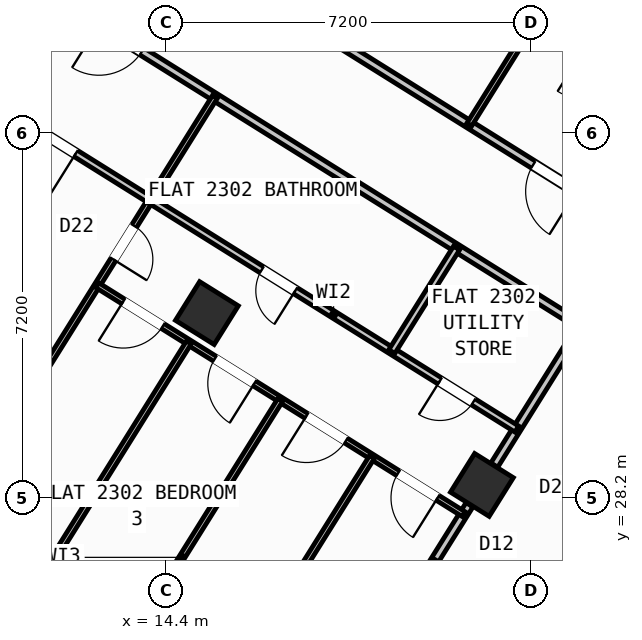
"""IFC4 building model, lengths in metres.
Left out: names, types, materials, properties, quantities, classifications, styles, units other than length and angle.
Written with IfcOpenShell. Run it as: python <this file> out.ifc"""

import sys

from ifc_helpers import new_model, si_unit, direction, frame, frame_2d, origin, origin_2d, place, context, subcontext, project, spatial, rectangle, hollow_rectangle, extrude, source, transform, mapped, element, fill, save


model = new_model("IFC4")
c1 = context("Model", 3, precision=1e-05, world=origin(), true_north=direction((0.0, 1.0)))
c2 = subcontext(c1, "Body", "Model", "MODEL_VIEW")
j1 = project(units=[si_unit("LENGTHUNIT", "METRE"), si_unit("PLANEANGLEUNIT", "RADIAN")], contexts=[c1])
p1 = place(None, origin())
s1 = spatial("IfcSite", under=j1, at=p1, CompositionType="ELEMENT")
p2 = place(p1, origin())
s2 = spatial("IfcBuilding", under=s1, at=p2, CompositionType="ELEMENT")
p3 = place(p2, frame((0.0, 0.0, 93.6)))
s3 = spatial("IfcBuildingStorey", under=s2, at=p3, CompositionType="ELEMENT", Elevation=93.6)
m1 = source(origin(), c2, "Body", "SweptSolid", [
    extrude(hollow_rectangle(XDim=0.9, YDim=0.9, WallThickness=0.036, at=origin_2d()), origin(), (0.0, 0.0, 1.0), 3.6),
])
for number, where, z_axis, x_axis in (
    (1, (20.632, 28.452, 0.0), (0.0, 0.0, 1.0), (-0.848, 0.53, 0.0)),
    (2, (15.205, 31.844, 0.0), (0.0, 0.0, 1.0), (-0.848, 0.53, 0.0)),
):
    element("IfcColumn", number, at=place(p3, frame(where, z_axis=z_axis, x_axis=x_axis)), inside=s3, PredefinedType="COLUMN", context=c2, shape_type="MappedRepresentation", body=[
        mapped(m1, transform((0.0, 0.0, 0.0), scale=1.0)),
    ])
p4 = place(p3, frame((31.76, 12.183, 0.0), z_axis=(0.0, 0.0, 1.0), x_axis=(-0.848047074256, 0.529920899612, 0.0)))
e3 = element("IfcWall", 3, at=p4, inside=s3, PredefinedType="STANDARD", context=c2, shape_type="SweptSolid", body=[
    extrude(rectangle(XDim=30.652, YDim=0.32, at=frame_2d((15.326, 0.0))), origin(), (0.0, 0.0, 1.0), 3.35),
])
p5 = place(p4, frame((15.153, 0.0, 0.0)))
e4 = element("IfcOpeningElement", 4, at=p5, cuts=e3, PredefinedType="OPENING", context=c2, shape_type="SweptSolid", body=[
    extrude(rectangle(XDim=1.2, YDim=2.15, at=frame_2d((0.6, 1.075))), frame((0.0, 0.17, 0.0), z_axis=(0.0, -1.0, 0.0), x_axis=(1.0, 0.0, 0.0)), (0.0, 0.0, 1.0), 0.34),
])
p6 = place(p4, frame((2.002, 0.0, 0.8)))
e5 = element("IfcOpeningElement", 5, at=p6, cuts=e3, PredefinedType="OPENING", context=c2, shape_type="SweptSolid", body=[
    extrude(rectangle(XDim=2.1, YDim=1.55, at=frame_2d((1.05, 0.775))), frame((0.0, 0.17, 0.0), z_axis=(0.0, -1.0, 0.0), x_axis=(1.0, 0.0, 0.0)), (0.0, 0.0, 1.0), 0.34),
])
p7 = place(p4, frame((7.206, 0.0, 0.8)))
e6 = element("IfcOpeningElement", 6, at=p7, cuts=e3, PredefinedType="OPENING", context=c2, shape_type="SweptSolid", body=[
    extrude(rectangle(XDim=2.1, YDim=1.55, at=frame_2d((1.05, 0.775))), frame((0.0, 0.17, 0.0), z_axis=(0.0, -1.0, 0.0), x_axis=(1.0, 0.0, 0.0)), (0.0, 0.0, 1.0), 0.34),
])
p8 = place(p4, frame((12.648, 0.0, 1.0)))
e7 = element("IfcOpeningElement", 7, at=p8, cuts=e3, PredefinedType="OPENING", context=c2, shape_type="SweptSolid", body=[
    extrude(rectangle(XDim=0.9, YDim=1.25, at=frame_2d((0.45, 0.625))), frame((0.0, 0.17, 0.0), z_axis=(0.0, -1.0, 0.0), x_axis=(1.0, 0.0, 0.0)), (0.0, 0.0, 1.0), 0.34),
])
p9 = place(p4, frame((27.974, 0.0, 0.95)))
e8 = element("IfcOpeningElement", 8, at=p9, cuts=e3, PredefinedType="OPENING", context=c2, shape_type="SweptSolid", body=[
    extrude(rectangle(XDim=1.2, YDim=1.4, at=frame_2d((0.6, 0.7))), frame((0.0, 0.17, 0.0), z_axis=(0.0, -1.0, 0.0), x_axis=(1.0, 0.0, 0.0)), (0.0, 0.0, 1.0), 0.34),
])
p10 = place(p4, frame((18.347, 0.0, 1.0)))
e9 = element("IfcOpeningElement", 9, at=p10, cuts=e3, PredefinedType="OPENING", context=c2, shape_type="SweptSolid", body=[
    extrude(rectangle(XDim=0.9, YDim=1.25, at=frame_2d((0.45, 0.625))), frame((0.0, 0.17, 0.0), z_axis=(0.0, -1.0, 0.0), x_axis=(1.0, 0.0, 0.0)), (0.0, 0.0, 1.0), 0.34),
])
p11 = place(p4, frame((20.931, 0.0, 1.0)))
e10 = element("IfcOpeningElement", 10, at=p11, cuts=e3, PredefinedType="OPENING", context=c2, shape_type="SweptSolid", body=[
    extrude(rectangle(XDim=0.65, YDim=1.15, at=frame_2d((0.325, 0.575))), frame((0.0, 0.17, 0.0), z_axis=(0.0, -1.0, 0.0), x_axis=(1.0, 0.0, 0.0)), (0.0, 0.0, 1.0), 0.34),
])
p12 = place(p4, frame((22.938, 0.0, 1.0)))
e11 = element("IfcOpeningElement", 11, at=p12, cuts=e3, PredefinedType="OPENING", context=c2, shape_type="SweptSolid", body=[
    extrude(rectangle(XDim=0.9, YDim=1.25, at=frame_2d((0.45, 0.625))), frame((0.0, 0.17, 0.0), z_axis=(0.0, -1.0, 0.0), x_axis=(1.0, 0.0, 0.0)), (0.0, 0.0, 1.0), 0.34),
])
p13 = place(p4, frame((25.069, 0.0, 1.0)))
e12 = element("IfcOpeningElement", 12, at=p13, cuts=e3, PredefinedType="OPENING", context=c2, shape_type="SweptSolid", body=[
    extrude(rectangle(XDim=0.9, YDim=1.25, at=frame_2d((0.45, 0.625))), frame((0.0, 0.17, 0.0), z_axis=(0.0, -1.0, 0.0), x_axis=(1.0, 0.0, 0.0)), (0.0, 0.0, 1.0), 0.34),
])
p14 = place(p3, frame((5.7, 28.71, 0.0), z_axis=(0.0, 0.0, 1.0), x_axis=(0.529923711467, 0.8480453172, 0.0)))
e13 = element("IfcWall", 13, at=p14, inside=s3, PredefinedType="STANDARD", context=c2, shape_type="SweptSolid", body=[
    extrude(rectangle(XDim=21.587, YDim=0.32, at=frame_2d((10.794, 0.0))), origin(), (0.0, 0.0, 1.0), 2.775),
])
p15 = place(p14, frame((2.994, 0.0, 0.8)))
e14 = element("IfcOpeningElement", 14, at=p15, cuts=e13, PredefinedType="OPENING", context=c2, shape_type="SweptSolid", body=[
    extrude(rectangle(XDim=2.1, YDim=1.55, at=frame_2d((1.05, 0.775))), frame((0.0, 0.17, 0.0), z_axis=(0.0, -1.0, 0.0), x_axis=(1.0, 0.0, 0.0)), (0.0, 0.0, 1.0), 0.34),
])
p16 = place(p14, frame((9.739, 0.0, 1.0)))
e15 = element("IfcOpeningElement", 15, at=p16, cuts=e13, PredefinedType="OPENING", context=c2, shape_type="SweptSolid", body=[
    extrude(rectangle(XDim=0.9, YDim=1.25, at=frame_2d((0.45, 0.625))), frame((0.0, 0.17, 0.0), z_axis=(0.0, -1.0, 0.0), x_axis=(1.0, 0.0, 0.0)), (0.0, 0.0, 1.0), 0.34),
])
p17 = place(p14, frame((18.639, 0.0, 0.85)))
e16 = element("IfcOpeningElement", 16, at=p17, cuts=e13, PredefinedType="OPENING", context=c2, shape_type="SweptSolid", body=[
    extrude(rectangle(XDim=1.5, YDim=1.5, at=frame_2d((0.75, 0.75))), frame((0.0, 0.17, 0.0), z_axis=(0.0, -1.0, 0.0), x_axis=(1.0, 0.0, 0.0)), (0.0, 0.0, 1.0), 0.34),
])
p18 = place(p3, frame((17.424, 47.083, 0.0), z_axis=(0.0, 0.0, 1.0), x_axis=(0.848049927979, -0.529916332693, 0.0)))
e17 = element("IfcWall", 17, at=p18, inside=s3, PredefinedType="STANDARD", context=c2, shape_type="SweptSolid", body=[
    extrude(rectangle(XDim=29.223, YDim=0.32, at=frame_2d((14.612, 0.0))), origin(), (0.0, 0.0, 1.0), 3.35),
])
p19 = place(p18, frame((3.745, 0.0, 0.0)))
e18 = element("IfcOpeningElement", 18, at=p19, cuts=e17, PredefinedType="OPENING", context=c2, shape_type="SweptSolid", body=[
    extrude(rectangle(XDim=1.05, YDim=2.15, at=frame_2d((0.525, 1.075))), frame((0.0, 0.17, 0.0), z_axis=(0.0, -1.0, 0.0), x_axis=(1.0, 0.0, 0.0)), (0.0, 0.0, 1.0), 0.34),
])
p20 = place(p18, frame((0.699, 0.0, 0.95)))
e19 = element("IfcOpeningElement", 19, at=p20, cuts=e17, PredefinedType="OPENING", context=c2, shape_type="SweptSolid", body=[
    extrude(rectangle(XDim=1.2, YDim=1.4, at=frame_2d((0.6, 0.7))), frame((0.0, 0.17, 0.0), z_axis=(0.0, -1.0, 0.0), x_axis=(1.0, 0.0, 0.0)), (0.0, 0.0, 1.0), 0.34),
])
p21 = place(p18, frame((6.951, 0.0, 1.0)))
e20 = element("IfcOpeningElement", 20, at=p21, cuts=e17, PredefinedType="OPENING", context=c2, shape_type="SweptSolid", body=[
    extrude(rectangle(XDim=0.9, YDim=1.25, at=frame_2d((0.45, 0.625))), frame((0.0, 0.17, 0.0), z_axis=(0.0, -1.0, 0.0), x_axis=(1.0, 0.0, 0.0)), (0.0, 0.0, 1.0), 0.34),
])
p22 = place(p18, frame((9.841, 0.0, 0.85)))
e21 = element("IfcOpeningElement", 21, at=p22, cuts=e17, PredefinedType="OPENING", context=c2, shape_type="SweptSolid", body=[
    extrude(rectangle(XDim=1.5, YDim=1.5, at=frame_2d((0.75, 0.75))), frame((0.0, 0.17, 0.0), z_axis=(0.0, -1.0, 0.0), x_axis=(1.0, 0.0, 0.0)), (0.0, 0.0, 1.0), 0.34),
])
p23 = place(p18, frame((13.889, 0.0, 0.95)))
e22 = element("IfcOpeningElement", 22, at=p23, cuts=e17, PredefinedType="OPENING", context=c2, shape_type="SweptSolid", body=[
    extrude(rectangle(XDim=1.2, YDim=1.4, at=frame_2d((0.6, 0.7))), frame((0.0, 0.17, 0.0), z_axis=(0.0, -1.0, 0.0), x_axis=(1.0, 0.0, 0.0)), (0.0, 0.0, 1.0), 0.34),
])
p24 = place(p18, frame((17.254, 0.0, 1.0)))
e23 = element("IfcOpeningElement", 23, at=p24, cuts=e17, PredefinedType="OPENING", context=c2, shape_type="SweptSolid", body=[
    extrude(rectangle(XDim=0.9, YDim=1.25, at=frame_2d((0.45, 0.625))), frame((0.0, 0.17, 0.0), z_axis=(0.0, -1.0, 0.0), x_axis=(1.0, 0.0, 0.0)), (0.0, 0.0, 1.0), 0.34),
])
p25 = place(p18, frame((20.764, 0.0, 0.8)))
e24 = element("IfcOpeningElement", 24, at=p25, cuts=e17, PredefinedType="OPENING", context=c2, shape_type="SweptSolid", body=[
    extrude(rectangle(XDim=2.1, YDim=1.55, at=frame_2d((1.05, 0.775))), frame((0.0, 0.17, 0.0), z_axis=(0.0, -1.0, 0.0), x_axis=(1.0, 0.0, 0.0)), (0.0, 0.0, 1.0), 0.34),
])
p26 = place(p18, frame((25.403, 0.0, 0.8)))
e25 = element("IfcOpeningElement", 25, at=p26, cuts=e17, PredefinedType="OPENING", context=c2, shape_type="SweptSolid", body=[
    extrude(rectangle(XDim=2.1, YDim=1.55, at=frame_2d((1.05, 0.775))), frame((0.0, 0.17, 0.0), z_axis=(0.0, -1.0, 0.0), x_axis=(1.0, 0.0, 0.0)), (0.0, 0.0, 1.0), 0.34),
])
p27 = place(p3, frame((25.807, 29.582, 0.0), z_axis=(0.0, 0.0, 1.0), x_axis=(-0.529920357077, -0.848047413271, 0.0)))
e26 = element("IfcWall", 26, at=p27, inside=s3, PredefinedType="PARTITIONING", context=c2, shape_type="SweptSolid", body=[
    extrude(rectangle(XDim=11.45, YDim=0.16, at=frame_2d((5.725, 0.0))), origin(), (0.0, 0.0, 1.0), 3.34),
])
p28 = place(p3, frame((26.973, 31.447, 0.0), z_axis=(0.0, 0.0, 1.0), x_axis=(-0.848048310262, 0.529918921593, 0.0)))
e27 = element("IfcWall", 27, at=p28, inside=s3, PredefinedType="PARTITIONING", context=c2, shape_type="SweptSolid", body=[
    extrude(rectangle(XDim=16.73, YDim=0.16, at=frame_2d((8.365, 0.0))), origin(), (0.0, 0.0, 1.0), 3.34),
])
p29 = place(p28, frame((2.22, 0.0, 0.0)))
e28 = element("IfcOpeningElement", 28, at=p29, cuts=e27, PredefinedType="OPENING", context=c2, shape_type="SweptSolid", body=[
    extrude(rectangle(XDim=0.86, YDim=2.05, at=frame_2d((0.43, 1.025))), frame((0.0, 0.09, 0.0), z_axis=(0.0, -1.0, 0.0), x_axis=(1.0, 0.0, 0.0)), (0.0, 0.0, 1.0), 0.18),
])
p30 = place(p28, frame((5.28, 0.0, 0.0)))
e29 = element("IfcOpeningElement", 29, at=p30, cuts=e27, PredefinedType="OPENING", context=c2, shape_type="SweptSolid", body=[
    extrude(rectangle(XDim=1.0, YDim=2.1, at=frame_2d((0.5, 1.05))), frame((0.0, 0.09, 0.0), z_axis=(0.0, -1.0, 0.0), x_axis=(1.0, 0.0, 0.0)), (0.0, 0.0, 1.0), 0.18),
])
p31 = place(p3, frame((25.807, 29.582, 0.0), z_axis=(0.0, 0.0, 1.0), x_axis=(-0.848052408131, 0.529912363569, 0.0)))
e30 = element("IfcWall", 30, at=p31, inside=s3, PredefinedType="PARTITIONING", context=c2, shape_type="SweptSolid", body=[
    extrude(rectangle(XDim=16.73, YDim=0.16, at=frame_2d((8.365, 0.0))), origin(), (0.0, 0.0, 1.0), 3.34),
])
p32 = place(p31, frame((2.22, 0.0, 0.0)))
e31 = element("IfcOpeningElement", 31, at=p32, cuts=e30, PredefinedType="OPENING", context=c2, shape_type="SweptSolid", body=[
    extrude(rectangle(XDim=0.86, YDim=2.05, at=frame_2d((0.43, 1.025))), frame((0.0, 0.09, 0.0), z_axis=(0.0, -1.0, 0.0), x_axis=(1.0, 0.0, 0.0)), (0.0, 0.0, 1.0), 0.18),
])
p33 = place(p31, frame((14.013, 0.0, 0.0)))
e32 = element("IfcOpeningElement", 32, at=p33, cuts=e30, PredefinedType="OPENING", context=c2, shape_type="SweptSolid", body=[
    extrude(rectangle(XDim=1.0, YDim=2.1, at=frame_2d((0.5, 1.05))), frame((0.0, 0.09, 0.0), z_axis=(0.0, -1.0, 0.0), x_axis=(1.0, 0.0, 0.0)), (0.0, 0.0, 1.0), 0.18),
])
p34 = place(p3, frame((22.593, 31.59, 0.0), z_axis=(0.0, 0.0, 1.0), x_axis=(-0.529924383291, -0.848044897393, 0.0)))
e33 = element("IfcWall", 33, at=p34, inside=s3, PredefinedType="PARTITIONING", context=c2, shape_type="SweptSolid", body=[
    extrude(rectangle(XDim=3.238, YDim=0.16, at=frame_2d((1.619, 0.0))), origin(), (0.0, 0.0, 1.0), 2.775),
])
p35 = place(p3, frame((20.387, 28.06, 0.0), z_axis=(0.0, 0.0, 1.0), x_axis=(-0.529902564924, -0.848058530814, 0.0)))
e34 = element("IfcWall", 34, at=p35, inside=s3, PredefinedType="PARTITIONING", context=c2, shape_type="SweptSolid", body=[
    extrude(rectangle(XDim=6.376, YDim=0.16, at=frame_2d((3.188, 0.0))), origin(), (0.0, 0.0, 1.0), 2.775),
])
p36 = place(p3, frame((24.492, 30.403, 0.0), z_axis=(0.0, 0.0, 1.0), x_axis=(-0.529919283494, -0.848048084121, 0.0)))
e35 = element("IfcWall", 35, at=p36, inside=s3, PredefinedType="PLUMBINGWALL", context=c2, shape_type="SweptSolid", body=[
    extrude(rectangle(XDim=5.51, YDim=0.14, at=frame_2d((2.755, 0.0))), origin(), (0.0, 0.0, 1.0), 2.995),
])
p37 = place(p36, frame((2.365, 0.0, 0.0)))
e36 = element("IfcOpeningElement", 36, at=p37, cuts=e35, PredefinedType="OPENING", context=c2, shape_type="SweptSolid", body=[
    extrude(rectangle(XDim=0.78, YDim=2.05, at=frame_2d((0.39, 1.025))), frame((0.0, 0.08, 0.0), z_axis=(0.0, -1.0, 0.0), x_axis=(1.0, 0.0, 0.0)), (0.0, 0.0, 1.0), 0.16),
])
p38 = place(p3, frame((15.361, 36.108, 0.0), z_axis=(0.0, 0.0, 1.0), x_axis=(-0.529912802348, -0.848052133956, 0.0)))
e37 = element("IfcWall", 37, at=p38, inside=s3, PredefinedType="PARTITIONING", context=c2, shape_type="SweptSolid", body=[
    extrude(rectangle(XDim=11.72, YDim=0.11, at=frame_2d((5.86, 0.0))), origin(), (0.0, 0.0, 1.0), 2.995),
])
p39 = place(p38, frame((3.0, 0.0, 0.0)))
e38 = element("IfcOpeningElement", 38, at=p39, cuts=e37, PredefinedType="OPENING", context=c2, shape_type="SweptSolid", body=[
    extrude(rectangle(XDim=0.78, YDim=2.05, at=frame_2d((0.39, 1.025))), frame((0.0, 0.065, 0.0), z_axis=(0.0, -1.0, 0.0), x_axis=(1.0, 0.0, 0.0)), (0.0, 0.0, 1.0), 0.13),
])
p40 = place(p3, frame((14.09, 34.073, 0.0), z_axis=(0.0, 0.0, 1.0), x_axis=(-0.848045135007, 0.529924003034, 0.0)))
e39 = element("IfcWall", 39, at=p40, inside=s3, PredefinedType="PLUMBINGWALL", context=c2, shape_type="SweptSolid", body=[
    extrude(rectangle(XDim=4.393, YDim=0.14, at=frame_2d((2.196, 0.0))), origin(), (0.0, 0.0, 1.0), 3.34),
])
p41 = place(p40, frame((1.737, 0.0, 0.0)))
e40 = element("IfcOpeningElement", 40, at=p41, cuts=e39, PredefinedType="OPENING", context=c2, shape_type="SweptSolid", body=[
    extrude(rectangle(XDim=0.92, YDim=2.08, at=frame_2d((0.46, 1.04))), frame((0.0, 0.08, 0.0), z_axis=(0.0, -1.0, 0.0), x_axis=(1.0, 0.0, 0.0)), (0.0, 0.0, 1.0), 0.16),
])
p42 = place(p3, frame((21.321, 29.554, 0.0), z_axis=(0.0, 0.0, 1.0), x_axis=(-0.84803529765, 0.529939745575, 0.0)))
e41 = element("IfcWall", 41, at=p42, inside=s3, PredefinedType="PLUMBINGWALL", context=c2, shape_type="SweptSolid", body=[
    extrude(rectangle(XDim=8.527, YDim=0.14, at=frame_2d((4.264, 0.0))), origin(), (0.0, 0.0, 1.0), 3.34),
])
p43 = place(p42, frame((5.155, 0.0, 0.0)))
e42 = element("IfcOpeningElement", 42, at=p43, cuts=e41, PredefinedType="OPENING", context=c2, shape_type="SweptSolid", body=[
    extrude(rectangle(XDim=0.78, YDim=2.05, at=frame_2d((0.39, 1.025))), frame((0.0, 0.08, 0.0), z_axis=(0.0, -1.0, 0.0), x_axis=(1.0, 0.0, 0.0)), (0.0, 0.0, 1.0), 0.16),
])
p44 = place(p42, frame((1.011, 0.0, 0.0)))
e43 = element("IfcOpeningElement", 43, at=p44, cuts=e41, PredefinedType="OPENING", context=c2, shape_type="SweptSolid", body=[
    extrude(rectangle(XDim=0.78, YDim=2.05, at=frame_2d((0.39, 1.025))), frame((0.0, 0.08, 0.0), z_axis=(0.0, -1.0, 0.0), x_axis=(1.0, 0.0, 0.0)), (0.0, 0.0, 1.0), 0.16),
])
p45 = place(p3, frame((20.132, 33.128, 0.0), z_axis=(0.0, 0.0, 1.0), x_axis=(-0.529935194983, -0.848038141311, 0.0)))
e44 = element("IfcWall", 44, at=p45, inside=s3, PredefinedType="PLUMBINGWALL", context=c2, shape_type="SweptSolid", body=[
    extrude(rectangle(XDim=2.41, YDim=0.14, at=frame_2d((1.205, 0.0))), origin(), (0.0, 0.0, 1.0), 3.34),
])
p46 = place(p3, frame((20.272, 27.875, 0.0), z_axis=(0.0, 0.0, 1.0), x_axis=(-0.848056204746, 0.529906287557, 0.0)))
e45 = element("IfcWall", 45, at=p46, inside=s3, PredefinedType="PARTITIONING", context=c2, shape_type="SweptSolid", body=[
    extrude(rectangle(XDim=8.527, YDim=0.11, at=frame_2d((4.264, 0.0))), origin(), (0.0, 0.0, 1.0), 3.34),
])
p47 = place(p46, frame((0.606, 0.0, 0.0)))
e46 = element("IfcOpeningElement", 46, at=p47, cuts=e45, PredefinedType="OPENING", context=c2, shape_type="SweptSolid", body=[
    extrude(rectangle(XDim=0.92, YDim=2.08, at=frame_2d((0.46, 1.04))), frame((0.0, 0.065, 0.0), z_axis=(0.0, -1.0, 0.0), x_axis=(1.0, 0.0, 0.0)), (0.0, 0.0, 1.0), 0.13),
])
p48 = place(p46, frame((2.738, 0.0, 0.0)))
e47 = element("IfcOpeningElement", 47, at=p48, cuts=e45, PredefinedType="OPENING", context=c2, shape_type="SweptSolid", body=[
    extrude(rectangle(XDim=0.92, YDim=2.08, at=frame_2d((0.46, 1.04))), frame((0.0, 0.065, 0.0), z_axis=(0.0, -1.0, 0.0), x_axis=(1.0, 0.0, 0.0)), (0.0, 0.0, 1.0), 0.13),
])
p49 = place(p46, frame((4.869, 0.0, 0.0)))
e48 = element("IfcOpeningElement", 48, at=p49, cuts=e45, PredefinedType="OPENING", context=c2, shape_type="SweptSolid", body=[
    extrude(rectangle(XDim=0.92, YDim=2.08, at=frame_2d((0.46, 1.04))), frame((0.0, 0.065, 0.0), z_axis=(0.0, -1.0, 0.0), x_axis=(1.0, 0.0, 0.0)), (0.0, 0.0, 1.0), 0.13),
])
p50 = place(p46, frame((7.001, 0.0, 0.0)))
e49 = element("IfcOpeningElement", 49, at=p50, cuts=e45, PredefinedType="OPENING", context=c2, shape_type="SweptSolid", body=[
    extrude(rectangle(XDim=0.92, YDim=2.08, at=frame_2d((0.46, 1.04))), frame((0.0, 0.065, 0.0), z_axis=(0.0, -1.0, 0.0), x_axis=(1.0, 0.0, 0.0)), (0.0, 0.0, 1.0), 0.13),
])
for number, where, z_axis, x_axis in (
    (50, (18.464, 29.005, 0.0), (0.0, 0.0, 1.0), (-0.53, -0.848, 0.0)),
    (51, (16.656, 30.135, 0.0), (0.0, 0.0, 1.0), (-0.53, -0.848, 0.0)),
):
    element("IfcWall", number, at=place(p3, frame(where, z_axis=z_axis, x_axis=x_axis)), inside=s3, PredefinedType="PARTITIONING", context=c2, shape_type="SweptSolid", body=[
        extrude(rectangle(XDim=7.34, YDim=0.11, at=frame_2d((3.67, 0.0))), origin(), (0.0, 0.0, 1.0), 2.995),
    ])
p51 = place(p3, frame((14.848, 31.264, 0.0), z_axis=(0.0, 0.0, 1.0), x_axis=(-0.529920534869, -0.848047302174, 0.0)))
e52 = element("IfcWall", 52, at=p51, inside=s3, PredefinedType="PARTITIONING", context=c2, shape_type="SweptSolid", body=[
    extrude(rectangle(XDim=6.158, YDim=0.11, at=frame_2d((3.079, 0.0))), origin(), (0.0, 0.0, 1.0), 2.775),
])
p52 = place(p3, frame((24.792, 42.62, 0.0), z_axis=(0.0, 0.0, 1.0), x_axis=(-0.529925083182, -0.848044460046, 0.0)))
e53 = element("IfcWall", 53, at=p52, inside=s3, PredefinedType="PARTITIONING", context=c2, shape_type="SweptSolid", body=[
    extrude(rectangle(XDim=8.32, YDim=0.11, at=frame_2d((4.16, 0.0))), origin(), (0.0, 0.0, 1.0), 3.34),
])
p53 = place(p52, frame((4.65, 0.0, 0.0)))
e54 = element("IfcOpeningElement", 54, at=p53, cuts=e53, PredefinedType="OPENING", context=c2, shape_type="SweptSolid", body=[
    extrude(rectangle(XDim=0.78, YDim=2.05, at=frame_2d((0.39, 1.025))), frame((0.0, 0.065, 0.0), z_axis=(0.0, -1.0, 0.0), x_axis=(1.0, 0.0, 0.0)), (0.0, 0.0, 1.0), 0.13),
])
p54 = place(p3, frame((25.03, 35.491, 0.0), z_axis=(0.0, 0.0, 1.0), x_axis=(-0.848070667369, 0.52988314103, 0.0)))
e55 = element("IfcWall", 55, at=p54, inside=s3, PredefinedType="PLUMBINGWALL", context=c2, shape_type="SweptSolid", body=[
    extrude(rectangle(XDim=3.98, YDim=0.14, at=frame_2d((1.99, 0.0))), origin(), (0.0, 0.0, 1.0), 3.34),
])
p55 = place(p54, frame((1.93, 0.0, 0.0)))
e56 = element("IfcOpeningElement", 56, at=p55, cuts=e55, PredefinedType="OPENING", context=c2, shape_type="SweptSolid", body=[
    extrude(rectangle(XDim=0.92, YDim=2.08, at=frame_2d((0.46, 1.04))), frame((0.0, 0.08, 0.0), z_axis=(0.0, -1.0, 0.0), x_axis=(1.0, 0.0, 0.0)), (0.0, 0.0, 1.0), 0.16),
])
m2 = source(origin(), c2, "Body", "SweptSolid", [
    extrude(rectangle(XDim=1.0, YDim=2.1, at=frame_2d((0.5, 1.05))), frame((0.0, 0.025, 0.0), z_axis=(0.0, -1.0, 0.0), x_axis=(1.0, 0.0, 0.0)), (0.0, 0.0, 1.0), 0.05),
])
p56 = place(p33, origin())
e57 = element("IfcDoor", 57, at=p56, inside=s3, OperationType="SINGLE_SWING_RIGHT", PredefinedType="DOOR", context=c2, shape_type="MappedRepresentation", body=[
    mapped(m2, transform((0.0, 0.0, 0.0), scale=1.0)),
])
fill(e32, e57)
m3 = source(origin(), c2, "Body", "SweptSolid", [
    extrude(rectangle(XDim=0.92, YDim=2.08, at=frame_2d((0.46, 1.04))), frame((0.0, 0.025, 0.0), z_axis=(0.0, -1.0, 0.0), x_axis=(1.0, 0.0, 0.0)), (0.0, 0.0, 1.0), 0.05),
])
p57 = place(p41, origin())
e58 = element("IfcDoor", 58, at=p57, inside=s3, OperationType="SINGLE_SWING_LEFT", PredefinedType="DOOR", context=c2, shape_type="MappedRepresentation", body=[
    mapped(m3, transform((0.0, 0.0, 0.0), scale=1.0)),
])
fill(e40, e58)
m4 = source(origin(), c2, "Body", "SweptSolid", [
    extrude(rectangle(XDim=0.78, YDim=2.05, at=frame_2d((0.39, 1.025))), frame((0.0, 0.025, 0.0), z_axis=(0.0, -1.0, 0.0), x_axis=(1.0, 0.0, 0.0)), (0.0, 0.0, 1.0), 0.05),
])
p58 = place(p39, origin())
e59 = element("IfcDoor", 59, at=p58, inside=s3, OperationType="SINGLE_SWING_RIGHT", PredefinedType="DOOR", context=c2, shape_type="MappedRepresentation", body=[
    mapped(m4, transform((0.0, 0.0, 0.0), scale=1.0)),
])
fill(e38, e59)
p59 = place(p43, origin())
e60 = element("IfcDoor", 60, at=p59, inside=s3, OperationType="SINGLE_SWING_LEFT", PredefinedType="DOOR", context=c2, shape_type="MappedRepresentation", body=[
    mapped(m4, transform((0.0, 0.0, 0.0), scale=1.0)),
])
fill(e42, e60)
p60 = place(p44, origin())
e61 = element("IfcDoor", 61, at=p60, inside=s3, OperationType="SINGLE_SWING_RIGHT", PredefinedType="DOOR", context=c2, shape_type="MappedRepresentation", body=[
    mapped(m4, transform((0.0, 0.0, 0.0), scale=1.0)),
])
fill(e43, e61)
p61 = place(p47, origin())
e62 = element("IfcDoor", 62, at=p61, inside=s3, OperationType="SINGLE_SWING_LEFT", PredefinedType="DOOR", context=c2, shape_type="MappedRepresentation", body=[
    mapped(m3, transform((0.0, 0.0, 0.0), scale=1.0)),
])
fill(e46, e62)
p62 = place(p48, origin())
e63 = element("IfcDoor", 63, at=p62, inside=s3, OperationType="SINGLE_SWING_RIGHT", PredefinedType="DOOR", context=c2, shape_type="MappedRepresentation", body=[
    mapped(m3, transform((0.0, 0.0, 0.0), scale=1.0)),
])
fill(e47, e63)
p63 = place(p49, origin())
e64 = element("IfcDoor", 64, at=p63, inside=s3, OperationType="SINGLE_SWING_LEFT", PredefinedType="DOOR", context=c2, shape_type="MappedRepresentation", body=[
    mapped(m3, transform((0.0, 0.0, 0.0), scale=1.0)),
])
fill(e48, e64)
p64 = place(p50, origin())
e65 = element("IfcDoor", 65, at=p64, inside=s3, OperationType="SINGLE_SWING_RIGHT", PredefinedType="DOOR", context=c2, shape_type="MappedRepresentation", body=[
    mapped(m3, transform((0.0, 0.0, 0.0), scale=1.0)),
])
fill(e49, e65)
p65 = place(p30, origin())
e66 = element("IfcDoor", 66, at=p65, inside=s3, OperationType="SINGLE_SWING_LEFT", PredefinedType="DOOR", context=c2, shape_type="MappedRepresentation", body=[
    mapped(m2, transform((0.0, 0.0, 0.0), scale=1.0)),
])
fill(e29, e66)
save(model, sys.argv[1])
